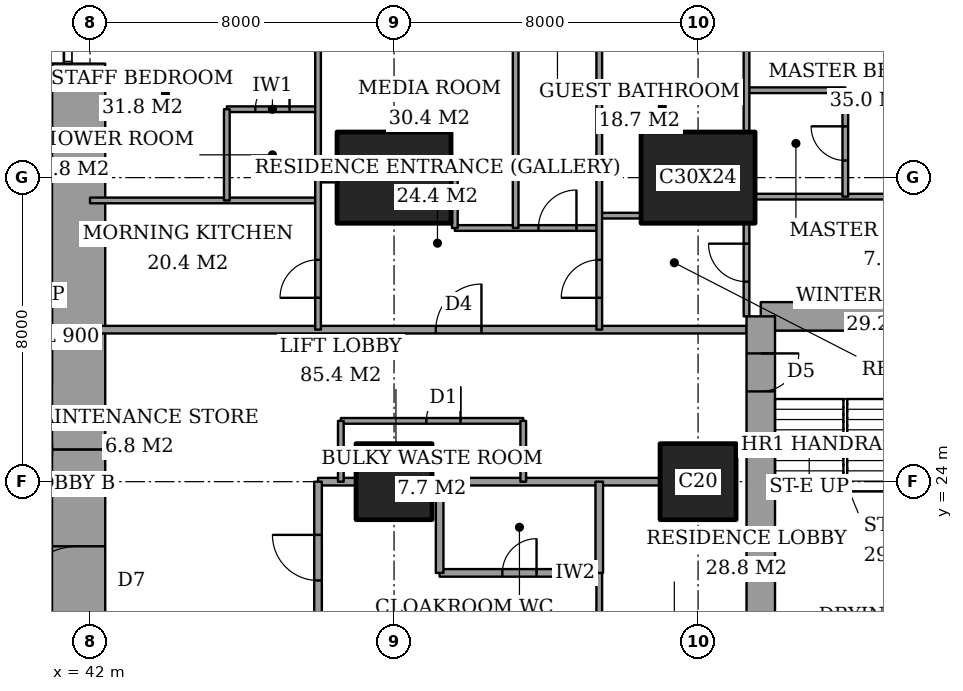
"""IFC4 building model, lengths in metres.
Left out: names, types, materials, properties, quantities, classifications, styles, units other than length and angle.
Written with IfcOpenShell. Run it as: python <this file> out.ifc"""

import sys

from ifc_helpers import new_model, si_unit, direction, frame, frame_2d, origin, origin_2d, place, context, subcontext, project, spatial, rectangle, extrude, element, fill, save


model = new_model("IFC4")
c1 = context("Model", 3, precision=1e-05, world=origin(), true_north=direction((0.0, 1.0)))
c2 = subcontext(c1, "Body", "Model", "MODEL_VIEW")
j1 = project(units=[si_unit("LENGTHUNIT", "METRE"), si_unit("PLANEANGLEUNIT", "RADIAN")], contexts=[c1])
p1 = place(None, origin())
s1 = spatial("IfcSite", under=j1, at=p1, CompositionType="ELEMENT")
p2 = place(p1, origin())
s2 = spatial("IfcBuilding", under=s1, at=p2, CompositionType="ELEMENT")
p3 = place(p2, frame((0.0, 0.0, 164.6)))
s3 = spatial("IfcBuildingStorey", under=s2, at=p3, CompositionType="ELEMENT", Elevation=164.6)
p4 = place(p3, frame((50.0, 24.0, 0.0), z_axis=(0.0, 0.0, 1.0), x_axis=(1.0, 0.0, 0.0)))
e1 = element("IfcColumn", 1, at=p4, inside=s3, PredefinedType="COLUMN", context=c2, shape_type="SweptSolid", body=[
    extrude(rectangle(XDim=2.0, YDim=2.0, at=origin_2d()), origin(), (0.0, 0.0, 1.0), 3.6),
])
p5 = place(p3, frame((50.0, 32.0, 0.0), z_axis=(0.0, 0.0, 1.0), x_axis=(1.0, 0.0, 0.0)))
e2 = element("IfcColumn", 2, at=p5, inside=s3, PredefinedType="COLUMN", context=c2, shape_type="SweptSolid", body=[
    extrude(rectangle(XDim=3.0, YDim=2.4, at=origin_2d()), origin(), (0.0, 0.0, 1.0), 3.6),
])
p6 = place(p3, frame((58.0, 24.0, 0.0), z_axis=(0.0, 0.0, 1.0), x_axis=(1.0, 0.0, 0.0)))
e3 = element("IfcColumn", 3, at=p6, inside=s3, PredefinedType="COLUMN", context=c2, shape_type="SweptSolid", body=[
    extrude(rectangle(XDim=2.0, YDim=2.0, at=origin_2d()), origin(), (0.0, 0.0, 1.0), 3.6),
])
p7 = place(p3, frame((58.0, 32.0, 0.0), z_axis=(0.0, 0.0, 1.0), x_axis=(1.0, 0.0, 0.0)))
e4 = element("IfcColumn", 4, at=p7, inside=s3, PredefinedType="COLUMN", context=c2, shape_type="SweptSolid", body=[
    extrude(rectangle(XDim=3.0, YDim=2.4, at=origin_2d()), origin(), (0.0, 0.0, 1.0), 3.6),
])
p8 = place(p3, frame((41.7, 13.0, 0.0), z_axis=(0.0, 0.0, 1.0), x_axis=(0.0, 1.0, 0.0)))
e5 = element("IfcWall", 5, at=p8, inside=s3, PredefinedType="SHEAR", context=c2, shape_type="SweptSolid", body=[
    extrude(rectangle(XDim=11.85, YDim=1.4, at=frame_2d((5.925, 0.0))), origin(), (0.0, 0.0, 1.0), 3.6),
])
p9 = place(p8, frame((7.5, 0.0, 0.0)))
e6 = element("IfcOpeningElement", 6, at=p9, cuts=e5, PredefinedType="OPENING", context=c2, shape_type="SweptSolid", body=[
    extrude(rectangle(XDim=1.8, YDim=2.4, at=frame_2d((0.9, 1.2))), frame((0.0, 0.71, 0.0), z_axis=(0.0, -1.0, 0.0), x_axis=(1.0, 0.0, 0.0)), (0.0, 0.0, 1.0), 1.42),
])
p10 = place(p3, frame((41.7, 24.85, 0.0), z_axis=(0.0, 0.0, 1.0), x_axis=(0.0, 1.0, 0.0)))
e7 = element("IfcWall", 7, at=p10, inside=s3, PredefinedType="SHEAR", context=c2, shape_type="SweptSolid", body=[
    extrude(rectangle(XDim=10.15, YDim=1.4, at=frame_2d((5.075, 0.0))), origin(), (0.0, 0.0, 1.0), 3.6),
])
p11 = place(p3, frame((64.1, 28.35, 0.0), z_axis=(0.0, 0.0, 1.0), x_axis=(-1.0, 0.0, 0.0)))
e8 = element("IfcWall", 8, at=p11, inside=s3, PredefinedType="SHEAR", context=c2, shape_type="SweptSolid", body=[
    extrude(rectangle(XDim=4.45, YDim=0.75, at=frame_2d((2.225, 0.0))), origin(), (0.0, 0.0, 1.0), 3.6),
])
p12 = place(p3, frame((59.65, 28.35, 0.0), z_axis=(0.0, 0.0, 1.0), x_axis=(0.0, -1.0, 0.0)))
e9 = element("IfcWall", 9, at=p12, inside=s3, PredefinedType="SHEAR", context=c2, shape_type="SweptSolid", body=[
    extrude(rectangle(XDim=8.7, YDim=0.75, at=frame_2d((4.35, 0.0))), origin(), (0.0, 0.0, 1.0), 3.6),
])
p13 = place(p12, frame((0.975, 0.0, 0.0)))
e10 = element("IfcOpeningElement", 10, at=p13, cuts=e9, PredefinedType="OPENING", context=c2, shape_type="SweptSolid", body=[
    extrude(rectangle(XDim=1.0, YDim=2.1, at=frame_2d((0.5, 1.05))), frame((0.0, 0.385, 0.0), z_axis=(0.0, -1.0, 0.0), x_axis=(1.0, 0.0, 0.0)), (0.0, 0.0, 1.0), 0.77),
])
p14 = place(p3, frame((51.2, 21.6, 0.0), z_axis=(0.0, 0.0, 1.0), x_axis=(1.0, 0.0, 0.0)))
e11 = element("IfcWall", 11, at=p14, inside=s3, PredefinedType="PARTITIONING", context=c2, shape_type="SweptSolid", body=[
    extrude(rectangle(XDim=4.2, YDim=0.2, at=frame_2d((2.1, 0.0))), origin(), (0.0, 0.0, 1.0), 3.35),
])
p15 = place(p14, frame((1.65, 0.0, 0.0)))
e12 = element("IfcOpeningElement", 12, at=p15, cuts=e11, PredefinedType="OPENING", context=c2, shape_type="SweptSolid", body=[
    extrude(rectangle(XDim=0.9, YDim=2.1, at=frame_2d((0.45, 1.05))), frame((0.0, 0.11, 0.0), z_axis=(0.0, -1.0, 0.0), x_axis=(1.0, 0.0, 0.0)), (0.0, 0.0, 1.0), 0.22),
])
p16 = place(p3, frame((48.0, 24.0, 0.0), z_axis=(0.0, 0.0, 1.0), x_axis=(1.0, 0.0, 0.0)))
e13 = element("IfcWall", 13, at=p16, inside=s3, PredefinedType="PARTITIONING", context=c2, shape_type="SweptSolid", body=[
    extrude(rectangle(XDim=1.0, YDim=0.2, at=frame_2d((0.5, 0.0))), origin(), (0.0, 0.0, 1.0), 3.35),
])
p17 = place(p3, frame((51.0, 24.0, 0.0), z_axis=(0.0, 0.0, 1.0), x_axis=(1.0, 0.0, 0.0)))
e14 = element("IfcWall", 14, at=p17, inside=s3, PredefinedType="PARTITIONING", context=c2, shape_type="SweptSolid", body=[
    extrude(rectangle(XDim=6.0, YDim=0.2, at=frame_2d((3.0, 0.0))), origin(), (0.0, 0.0, 1.0), 3.35),
])
p18 = place(p3, frame((48.6, 25.6, 0.0), z_axis=(0.0, 0.0, 1.0), x_axis=(1.0, 0.0, 0.0)))
e15 = element("IfcWall", 15, at=p18, inside=s3, PredefinedType="PARTITIONING", context=c2, shape_type="SweptSolid", body=[
    extrude(rectangle(XDim=4.8, YDim=0.15, at=frame_2d((2.4, 0.0))), origin(), (0.0, 0.0, 1.0), 3.35),
])
p19 = place(p18, frame((2.25, 0.0, 0.0)))
e16 = element("IfcOpeningElement", 16, at=p19, cuts=e15, PredefinedType="OPENING", context=c2, shape_type="SweptSolid", body=[
    extrude(rectangle(XDim=0.9, YDim=2.1, at=frame_2d((0.45, 1.05))), frame((0.0, 0.085, 0.0), z_axis=(0.0, -1.0, 0.0), x_axis=(1.0, 0.0, 0.0)), (0.0, 0.0, 1.0), 0.17),
])
p20 = place(p3, frame((42.0, 28.0, 0.0), z_axis=(0.0, 0.0, 1.0), x_axis=(1.0, 0.0, 0.0)))
e17 = element("IfcWall", 17, at=p20, inside=s3, PredefinedType="PARTITIONING", context=c2, shape_type="SweptSolid", body=[
    extrude(rectangle(XDim=17.275, YDim=0.2, at=frame_2d((8.637, 0.0))), origin(), (0.0, 0.0, 1.0), 3.35),
])
p21 = place(p20, frame((9.1, 0.0, 0.0)))
e18 = element("IfcOpeningElement", 18, at=p21, cuts=e17, PredefinedType="OPENING", context=c2, shape_type="SweptSolid", body=[
    extrude(rectangle(XDim=1.2, YDim=2.4, at=frame_2d((0.6, 1.2))), frame((0.0, 0.11, 0.0), z_axis=(0.0, -1.0, 0.0), x_axis=(1.0, 0.0, 0.0)), (0.0, 0.0, 1.0), 0.22),
])
p22 = place(p3, frame((51.6, 30.675, 0.0), z_axis=(0.0, 0.0, 1.0), x_axis=(1.0, 0.0, 0.0)))
e19 = element("IfcWall", 19, at=p22, inside=s3, PredefinedType="PARTITIONING", context=c2, shape_type="SweptSolid", body=[
    extrude(rectangle(XDim=3.8, YDim=0.15, at=frame_2d((1.9, 0.0))), origin(), (0.0, 0.0, 1.0), 3.35),
])
p23 = place(p22, frame((2.2, 0.0, 0.0)))
e20 = element("IfcOpeningElement", 20, at=p23, cuts=e19, PredefinedType="OPENING", context=c2, shape_type="SweptSolid", body=[
    extrude(rectangle(XDim=1.0, YDim=2.1, at=frame_2d((0.5, 1.05))), frame((0.0, 0.085, 0.0), z_axis=(0.0, -1.0, 0.0), x_axis=(1.0, 0.0, 0.0)), (0.0, 0.0, 1.0), 0.17),
])
p24 = place(p3, frame((55.4, 31.0, 0.0), z_axis=(0.0, 0.0, 1.0), x_axis=(1.0, 0.0, 0.0)))
e21 = element("IfcWall", 21, at=p24, inside=s3, PredefinedType="PARTITIONING", context=c2, shape_type="SweptSolid", body=[
    extrude(rectangle(XDim=1.1, YDim=0.15, at=frame_2d((0.55, 0.0))), origin(), (0.0, 0.0, 1.0), 3.35),
])
p25 = place(p3, frame((42.0, 31.4, 0.0), z_axis=(0.0, 0.0, 1.0), x_axis=(1.0, 0.0, 0.0)))
e22 = element("IfcWall", 22, at=p25, inside=s3, PredefinedType="PARTITIONING", context=c2, shape_type="SweptSolid", body=[
    extrude(rectangle(XDim=6.0, YDim=0.15, at=frame_2d((3.0, 0.0))), origin(), (0.0, 0.0, 1.0), 3.35),
])
p26 = place(p3, frame((59.5, 31.5, 0.0), z_axis=(0.0, 0.0, 1.0), x_axis=(1.0, 0.0, 0.0)))
e23 = element("IfcWall", 23, at=p26, inside=s3, PredefinedType="PARTITIONING", context=c2, shape_type="SweptSolid", body=[
    extrude(rectangle(XDim=5.15, YDim=0.15, at=frame_2d((2.575, 0.0))), origin(), (0.0, 0.0, 1.0), 3.35),
])
p27 = place(p3, frame((48.0, 31.95, 0.0), z_axis=(0.0, 0.0, 1.0), x_axis=(1.0, 0.0, 0.0)))
e24 = element("IfcWall", 24, at=p27, inside=s3, PredefinedType="PARTITIONING", context=c2, shape_type="SweptSolid", body=[
    extrude(rectangle(XDim=0.5, YDim=0.15, at=frame_2d((0.25, 0.0))), origin(), (0.0, 0.0, 1.0), 2.634),
])
p28 = place(p3, frame((45.6, 33.8, 0.0), z_axis=(0.0, 0.0, 1.0), x_axis=(1.0, 0.0, 0.0)))
e25 = element("IfcWall", 25, at=p28, inside=s3, PredefinedType="PARTITIONING", context=c2, shape_type="SweptSolid", body=[
    extrude(rectangle(XDim=2.4, YDim=0.15, at=frame_2d((1.2, 0.0))), origin(), (0.0, 0.0, 1.0), 3.35),
])
p29 = place(p28, frame((0.75, 0.0, 0.0)))
e26 = element("IfcOpeningElement", 26, at=p29, cuts=e25, PredefinedType="OPENING", context=c2, shape_type="SweptSolid", body=[
    extrude(rectangle(XDim=0.9, YDim=2.1, at=frame_2d((0.45, 1.05))), frame((0.0, 0.085, 0.0), z_axis=(0.0, -1.0, 0.0), x_axis=(1.0, 0.0, 0.0)), (0.0, 0.0, 1.0), 0.17),
])
p30 = place(p3, frame((59.275, 34.3, 0.0), z_axis=(0.0, 0.0, 1.0), x_axis=(1.0, 0.0, 0.0)))
e27 = element("IfcWall", 27, at=p30, inside=s3, PredefinedType="PARTITIONING", context=c2, shape_type="SweptSolid", body=[
    extrude(rectangle(XDim=2.6, YDim=0.15, at=frame_2d((1.3, 0.0))), origin(), (0.0, 0.0, 1.0), 3.35),
])
p31 = place(p3, frame((45.6, 31.4, 0.0), z_axis=(0.0, 0.0, 1.0), x_axis=(0.0, 1.0, 0.0)))
e28 = element("IfcWall", 28, at=p31, inside=s3, PredefinedType="PARTITIONING", context=c2, shape_type="SweptSolid", body=[
    extrude(rectangle(XDim=2.4, YDim=0.15, at=frame_2d((1.2, 0.0))), origin(), (0.0, 0.0, 1.0), 3.35),
])
p32 = place(p3, frame((48.0, 17.5, 0.0), z_axis=(0.0, 0.0, 1.0), x_axis=(0.0, 1.0, 0.0)))
e29 = element("IfcWall", 29, at=p32, inside=s3, PredefinedType="PARTITIONING", context=c2, shape_type="SweptSolid", body=[
    extrude(rectangle(XDim=6.5, YDim=0.2, at=frame_2d((3.25, 0.0))), origin(), (0.0, 0.0, 1.0), 3.35),
])
p33 = place(p32, frame((3.9, 0.0, 0.0)))
e30 = element("IfcOpeningElement", 30, at=p33, cuts=e29, PredefinedType="OPENING", context=c2, shape_type="SweptSolid", body=[
    extrude(rectangle(XDim=1.2, YDim=2.4, at=frame_2d((0.6, 1.2))), frame((0.0, 0.11, 0.0), z_axis=(0.0, -1.0, 0.0), x_axis=(1.0, 0.0, 0.0)), (0.0, 0.0, 1.0), 0.22),
])
p34 = place(p32, frame((0.8, 0.0, 0.0)))
e31 = element("IfcOpeningElement", 31, at=p34, cuts=e29, PredefinedType="OPENING", context=c2, shape_type="SweptSolid", body=[
    extrude(rectangle(XDim=0.9, YDim=2.1, at=frame_2d((0.45, 1.05))), frame((0.0, 0.11, 0.0), z_axis=(0.0, -1.0, 0.0), x_axis=(1.0, 0.0, 0.0)), (0.0, 0.0, 1.0), 0.22),
])
p35 = place(p3, frame((48.0, 28.0, 0.0), z_axis=(0.0, 0.0, 1.0), x_axis=(0.0, 1.0, 0.0)))
e32 = element("IfcWall", 32, at=p35, inside=s3, PredefinedType="PARTITIONING", context=c2, shape_type="SweptSolid", body=[
    extrude(rectangle(XDim=9.4, YDim=0.15, at=frame_2d((4.7, 0.0))), origin(), (0.0, 0.0, 1.0), 3.35),
])
p36 = place(p35, frame((0.837, 0.0, 0.0)))
e33 = element("IfcOpeningElement", 33, at=p36, cuts=e32, PredefinedType="OPENING", context=c2, shape_type="SweptSolid", body=[
    extrude(rectangle(XDim=1.0, YDim=2.1, at=frame_2d((0.5, 1.05))), frame((0.0, 0.085, 0.0), z_axis=(0.0, -1.0, 0.0), x_axis=(1.0, 0.0, 0.0)), (0.0, 0.0, 1.0), 0.17),
])
p37 = place(p3, frame((48.6, 24.0, 0.0), z_axis=(0.0, 0.0, 1.0), x_axis=(0.0, 1.0, 0.0)))
e34 = element("IfcWall", 34, at=p37, inside=s3, PredefinedType="PARTITIONING", context=c2, shape_type="SweptSolid", body=[
    extrude(rectangle(XDim=1.6, YDim=0.15, at=frame_2d((0.8, 0.0))), origin(), (0.0, 0.0, 1.0), 3.35),
])
p38 = place(p3, frame((51.2, 21.6, 0.0), z_axis=(0.0, 0.0, 1.0), x_axis=(0.0, 1.0, 0.0)))
e35 = element("IfcWall", 35, at=p38, inside=s3, PredefinedType="PARTITIONING", context=c2, shape_type="SweptSolid", body=[
    extrude(rectangle(XDim=2.4, YDim=0.2, at=frame_2d((1.2, 0.0))), origin(), (0.0, 0.0, 1.0), 3.35),
])
p39 = place(p3, frame((51.6, 30.675, 0.0), z_axis=(0.0, 0.0, 1.0), x_axis=(0.0, 1.0, 0.0)))
e36 = element("IfcWall", 36, at=p39, inside=s3, PredefinedType="PARTITIONING", context=c2, shape_type="SweptSolid", body=[
    extrude(rectangle(XDim=1.275, YDim=0.15, at=frame_2d((0.637, 0.0))), origin(), (0.0, 0.0, 1.0), 3.35),
])
p40 = place(p3, frame((53.2, 30.675, 0.0), z_axis=(0.0, 0.0, 1.0), x_axis=(0.0, 1.0, 0.0)))
e37 = element("IfcWall", 37, at=p40, inside=s3, PredefinedType="PARTITIONING", context=c2, shape_type="SweptSolid", body=[
    extrude(rectangle(XDim=6.725, YDim=0.15, at=frame_2d((3.362, 0.0))), origin(), (0.0, 0.0, 1.0), 3.35),
])
p41 = place(p3, frame((53.4, 24.0, 0.0), z_axis=(0.0, 0.0, 1.0), x_axis=(0.0, 1.0, 0.0)))
e38 = element("IfcWall", 38, at=p41, inside=s3, PredefinedType="PARTITIONING", context=c2, shape_type="SweptSolid", body=[
    extrude(rectangle(XDim=1.6, YDim=0.15, at=frame_2d((0.8, 0.0))), origin(), (0.0, 0.0, 1.0), 3.35),
])
p42 = place(p3, frame((55.4, 21.6, 0.0), z_axis=(0.0, 0.0, 1.0), x_axis=(0.0, 1.0, 0.0)))
e39 = element("IfcWall", 39, at=p42, inside=s3, PredefinedType="PARTITIONING", context=c2, shape_type="SweptSolid", body=[
    extrude(rectangle(XDim=2.4, YDim=0.2, at=frame_2d((1.2, 0.0))), origin(), (0.0, 0.0, 1.0), 3.35),
])
p43 = place(p3, frame((55.4, 11.0, 0.0), z_axis=(0.0, 0.0, 1.0), x_axis=(0.0, 1.0, 0.0)))
e40 = element("IfcWall", 40, at=p43, inside=s3, PredefinedType="PARTITIONING", context=c2, shape_type="SweptSolid", body=[
    extrude(rectangle(XDim=10.6, YDim=0.15, at=frame_2d((5.3, 0.0))), origin(), (0.0, 0.0, 1.0), 3.35),
])
p44 = place(p43, frame((8.05, 0.0, 0.0)))
e41 = element("IfcOpeningElement", 41, at=p44, cuts=e40, PredefinedType="OPENING", context=c2, shape_type="SweptSolid", body=[
    extrude(rectangle(XDim=1.0, YDim=2.1, at=frame_2d((0.5, 1.05))), frame((0.0, 0.085, 0.0), z_axis=(0.0, -1.0, 0.0), x_axis=(1.0, 0.0, 0.0)), (0.0, 0.0, 1.0), 0.17),
])
p45 = place(p3, frame((55.4, 28.0, 0.0), z_axis=(0.0, 0.0, 1.0), x_axis=(0.0, 1.0, 0.0)))
e42 = element("IfcWall", 42, at=p45, inside=s3, PredefinedType="PARTITIONING", context=c2, shape_type="SweptSolid", body=[
    extrude(rectangle(XDim=9.4, YDim=0.15, at=frame_2d((4.7, 0.0))), origin(), (0.0, 0.0, 1.0), 3.35),
])
p46 = place(p45, frame((0.837, 0.0, 0.0)))
e43 = element("IfcOpeningElement", 43, at=p46, cuts=e42, PredefinedType="OPENING", context=c2, shape_type="SweptSolid", body=[
    extrude(rectangle(XDim=1.0, YDim=2.1, at=frame_2d((0.5, 1.05))), frame((0.0, 0.085, 0.0), z_axis=(0.0, -1.0, 0.0), x_axis=(1.0, 0.0, 0.0)), (0.0, 0.0, 1.0), 0.17),
])
p47 = place(p3, frame((59.275, 28.35, 0.0), z_axis=(0.0, 0.0, 1.0), x_axis=(0.0, 1.0, 0.0)))
e44 = element("IfcWall", 44, at=p47, inside=s3, PredefinedType="PARTITIONING", context=c2, shape_type="SweptSolid", body=[
    extrude(rectangle(XDim=2.45, YDim=0.15, at=frame_2d((1.225, 0.0))), origin(), (0.0, 0.0, 1.0), 3.35),
])
p48 = place(p47, frame((0.913, 0.0, 0.0)))
e45 = element("IfcOpeningElement", 45, at=p48, cuts=e44, PredefinedType="OPENING", context=c2, shape_type="SweptSolid", body=[
    extrude(rectangle(XDim=1.0, YDim=2.1, at=frame_2d((0.5, 1.05))), frame((0.0, 0.085, 0.0), z_axis=(0.0, -1.0, 0.0), x_axis=(1.0, 0.0, 0.0)), (0.0, 0.0, 1.0), 0.17),
])
p49 = place(p3, frame((59.275, 33.2, 0.0), z_axis=(0.0, 0.0, 1.0), x_axis=(0.0, 1.0, 0.0)))
e46 = element("IfcWall", 46, at=p49, inside=s3, PredefinedType="PARTITIONING", context=c2, shape_type="SweptSolid", body=[
    extrude(rectangle(XDim=4.2, YDim=0.15, at=frame_2d((2.1, 0.0))), origin(), (0.0, 0.0, 1.0), 3.35),
])
p50 = place(p3, frame((61.875, 31.5, 0.0), z_axis=(0.0, 0.0, 1.0), x_axis=(0.0, 1.0, 0.0)))
e47 = element("IfcWall", 47, at=p50, inside=s3, PredefinedType="PARTITIONING", context=c2, shape_type="SweptSolid", body=[
    extrude(rectangle(XDim=2.8, YDim=0.15, at=frame_2d((1.4, 0.0))), origin(), (0.0, 0.0, 1.0), 3.35),
])
p51 = place(p50, frame((0.95, 0.0, 0.0)))
e48 = element("IfcOpeningElement", 48, at=p51, cuts=e47, PredefinedType="OPENING", context=c2, shape_type="SweptSolid", body=[
    extrude(rectangle(XDim=0.9, YDim=2.1, at=frame_2d((0.45, 1.05))), frame((0.0, 0.085, 0.0), z_axis=(0.0, -1.0, 0.0), x_axis=(1.0, 0.0, 0.0)), (0.0, 0.0, 1.0), 0.17),
])
p52 = place(p15, origin())
e49 = element("IfcDoor", 49, at=p52, inside=s3, OperationType="SINGLE_SWING_LEFT", PredefinedType="DOOR", context=c2, shape_type="SweptSolid", body=[
    extrude(rectangle(XDim=0.9, YDim=2.1, at=frame_2d((0.45, 1.05))), frame((0.0, 0.025, 0.0), z_axis=(0.0, -1.0, 0.0), x_axis=(1.0, 0.0, 0.0)), (0.0, 0.0, 1.0), 0.05),
])
fill(e12, e49)
p53 = place(p33, origin())
e50 = element("IfcDoor", 50, at=p53, inside=s3, OperationType="SINGLE_SWING_LEFT", PredefinedType="DOOR", context=c2, shape_type="SweptSolid", body=[
    extrude(rectangle(XDim=1.2, YDim=2.4, at=frame_2d((0.6, 1.2))), frame((0.0, 0.025, 0.0), z_axis=(0.0, -1.0, 0.0), x_axis=(1.0, 0.0, 0.0)), (0.0, 0.0, 1.0), 0.05),
])
fill(e30, e50)
p54 = place(p51, origin())
e51 = element("IfcDoor", 51, at=p54, inside=s3, OperationType="SINGLE_SWING_LEFT", PredefinedType="DOOR", context=c2, shape_type="SweptSolid", body=[
    extrude(rectangle(XDim=0.9, YDim=2.1, at=frame_2d((0.45, 1.05))), frame((0.0, 0.025, 0.0), z_axis=(0.0, -1.0, 0.0), x_axis=(1.0, 0.0, 0.0)), (0.0, 0.0, 1.0), 0.05),
])
fill(e48, e51)
p55 = place(p48, origin())
e52 = element("IfcDoor", 52, at=p55, inside=s3, OperationType="SINGLE_SWING_LEFT", PredefinedType="DOOR", context=c2, shape_type="SweptSolid", body=[
    extrude(rectangle(XDim=1.0, YDim=2.1, at=frame_2d((0.5, 1.05))), frame((0.0, 0.025, 0.0), z_axis=(0.0, -1.0, 0.0), x_axis=(1.0, 0.0, 0.0)), (0.0, 0.0, 1.0), 0.05),
])
fill(e45, e52)
p56 = place(p46, origin())
e53 = element("IfcDoor", 53, at=p56, inside=s3, OperationType="SINGLE_SWING_RIGHT", PredefinedType="DOOR", context=c2, shape_type="SweptSolid", body=[
    extrude(rectangle(XDim=1.0, YDim=2.1, at=frame_2d((0.5, 1.05))), frame((0.0, 0.025, 0.0), z_axis=(0.0, -1.0, 0.0), x_axis=(1.0, 0.0, 0.0)), (0.0, 0.0, 1.0), 0.05),
])
fill(e43, e53)
p57 = place(p21, origin())
e54 = element("IfcDoor", 54, at=p57, inside=s3, OperationType="SINGLE_SWING_LEFT", PredefinedType="DOOR", context=c2, shape_type="SweptSolid", body=[
    extrude(rectangle(XDim=1.2, YDim=2.4, at=frame_2d((0.6, 1.2))), frame((0.0, 0.025, 0.0), z_axis=(0.0, -1.0, 0.0), x_axis=(1.0, 0.0, 0.0)), (0.0, 0.0, 1.0), 0.05),
])
fill(e18, e54)
p58 = place(p23, origin())
e55 = element("IfcDoor", 55, at=p58, inside=s3, OperationType="SINGLE_SWING_LEFT", PredefinedType="DOOR", context=c2, shape_type="SweptSolid", body=[
    extrude(rectangle(XDim=1.0, YDim=2.1, at=frame_2d((0.5, 1.05))), frame((0.0, 0.025, 0.0), z_axis=(0.0, -1.0, 0.0), x_axis=(1.0, 0.0, 0.0)), (0.0, 0.0, 1.0), 0.05),
])
fill(e20, e55)
p59 = place(p29, origin())
e56 = element("IfcDoor", 56, at=p59, inside=s3, OperationType="SINGLE_SWING_LEFT", PredefinedType="DOOR", context=c2, shape_type="SweptSolid", body=[
    extrude(rectangle(XDim=0.9, YDim=2.1, at=frame_2d((0.45, 1.05))), frame((0.0, 0.025, 0.0), z_axis=(0.0, -1.0, 0.0), x_axis=(1.0, 0.0, 0.0)), (0.0, 0.0, 1.0), 0.05),
])
fill(e26, e56)
p60 = place(p36, origin())
e57 = element("IfcDoor", 57, at=p60, inside=s3, OperationType="SINGLE_SWING_RIGHT", PredefinedType="DOOR", context=c2, shape_type="SweptSolid", body=[
    extrude(rectangle(XDim=1.0, YDim=2.1, at=frame_2d((0.5, 1.05))), frame((0.0, 0.025, 0.0), z_axis=(0.0, -1.0, 0.0), x_axis=(1.0, 0.0, 0.0)), (0.0, 0.0, 1.0), 0.05),
])
fill(e33, e57)
p61 = place(p19, origin())
e58 = element("IfcDoor", 58, at=p61, inside=s3, OperationType="SINGLE_SWING_LEFT", PredefinedType="DOOR", context=c2, shape_type="SweptSolid", body=[
    extrude(rectangle(XDim=0.9, YDim=2.1, at=frame_2d((0.45, 1.05))), frame((0.0, 0.025, 0.0), z_axis=(0.0, -1.0, 0.0), x_axis=(1.0, 0.0, 0.0)), (0.0, 0.0, 1.0), 0.05),
])
fill(e16, e58)
p62 = place(p9, origin())
e59 = element("IfcDoor", 59, at=p62, inside=s3, OperationType="DOUBLE_DOOR_DOUBLE_SWING", PredefinedType="DOOR", context=c2, shape_type="SweptSolid", body=[
    extrude(rectangle(XDim=1.8, YDim=2.4, at=frame_2d((0.9, 1.2))), frame((0.0, 0.025, 0.0), z_axis=(0.0, -1.0, 0.0), x_axis=(1.0, 0.0, 0.0)), (0.0, 0.0, 1.0), 0.05),
])
fill(e6, e59)
p63 = place(p13, origin())
e60 = element("IfcDoor", 60, at=p63, inside=s3, OperationType="SINGLE_SWING_RIGHT", PredefinedType="DOOR", context=c2, shape_type="SweptSolid", body=[
    extrude(rectangle(XDim=1.0, YDim=2.1, at=frame_2d((0.5, 1.05))), frame((0.0, 0.025, 0.0), z_axis=(0.0, -1.0, 0.0), x_axis=(1.0, 0.0, 0.0)), (0.0, 0.0, 1.0), 0.05),
])
fill(e10, e60)
save(model, sys.argv[1])
